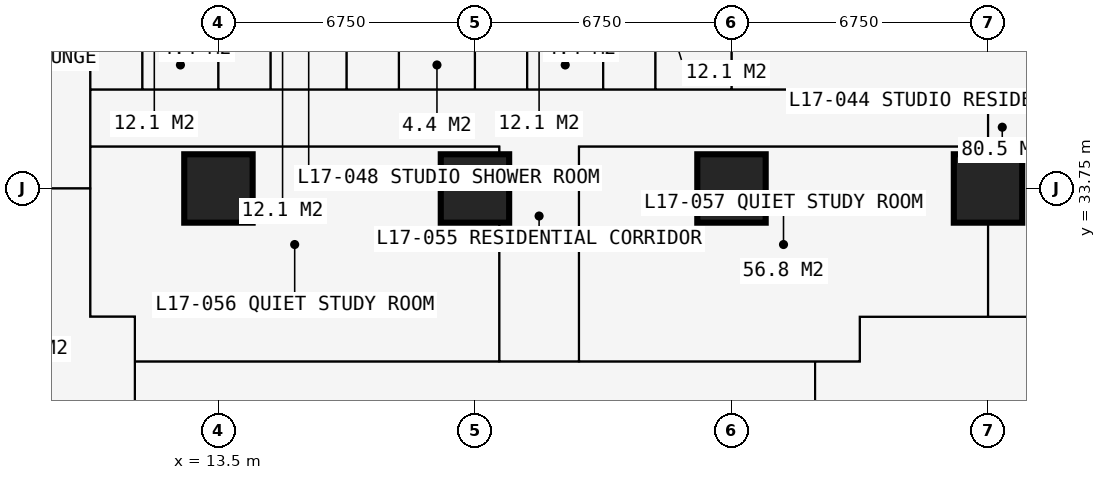
"""IFC4 building model, lengths in metres.
Left out: names, types, materials, properties, quantities, classifications, styles, units other than length and angle.
Written with IfcOpenShell. Run it as: python <this file> out.ifc"""

import sys

from ifc_helpers import new_model, si_unit, direction, frame, frame_2d, origin, origin_2d, place, context, subcontext, project, spatial, rectangle, extrude, element, fill, save


model = new_model("IFC4")
c1 = context("Model", 3, precision=1e-05, world=origin(), true_north=direction((0.0, 1.0)))
c2 = subcontext(c1, "Body", "Model", "MODEL_VIEW")
j1 = project(units=[si_unit("LENGTHUNIT", "METRE"), si_unit("PLANEANGLEUNIT", "RADIAN")], contexts=[c1])
p1 = place(None, origin())
s1 = spatial("IfcSite", under=j1, at=p1, CompositionType="ELEMENT")
p2 = place(p1, origin())
s2 = spatial("IfcBuilding", under=s1, at=p2, CompositionType="ELEMENT")
p3 = place(p2, frame((0.0, 0.0, 64.8)))
s3 = spatial("IfcBuildingStorey", under=s2, at=p3, CompositionType="ELEMENT", Elevation=64.8)
for number, where, z_axis, x_axis in (
    (1, (13.5, 33.75, 0.0), (0.0, 0.0, 1.0), (1.0, 0.0, 0.0)),
    (2, (20.25, 33.75, 0.0), (0.0, 0.0, 1.0), (1.0, 0.0, 0.0)),
    (3, (27.0, 33.75, 0.0), (0.0, 0.0, 1.0), (1.0, 0.0, 0.0)),
    (4, (33.75, 33.75, 0.0), (0.0, 0.0, 1.0), (1.0, 0.0, 0.0)),
):
    element("IfcColumn", number, at=place(p3, frame(where, z_axis=z_axis, x_axis=x_axis)), inside=s3, PredefinedType="COLUMN", context=c2, shape_type="SweptSolid", body=[
        extrude(rectangle(XDim=1.8, YDim=1.8, at=origin_2d()), origin(), (0.0, 0.0, 1.0), 3.6),
    ])
p4 = place(p3, frame((4.15, 33.75, 0.0), z_axis=(0.0, 0.0, 1.0), x_axis=(1.0, 0.0, 0.0)))
e5 = element("IfcWall", 5, at=p4, inside=s3, PredefinedType="PARTITIONING", context=c2, shape_type="SweptSolid", body=[
    extrude(rectangle(XDim=5.975, YDim=0.15, at=frame_2d((2.988, 0.0))), origin(), (0.0, 0.0, 1.0), 2.877),
])
p5 = place(p3, frame((10.125, 30.375, 0.0), z_axis=(0.0, 0.0, 1.0), x_axis=(0.0, 1.0, 0.0)))
e6 = element("IfcWall", 6, at=p5, inside=s3, PredefinedType="PARTITIONING", context=c2, shape_type="SweptSolid", body=[
    extrude(rectangle(XDim=10.859, YDim=0.15, at=frame_2d((5.429, 0.0))), origin(), (0.0, 0.0, 1.0), 3.375),
])
p6 = place(p5, frame((4.725, 0.0, 0.0)))
e7 = element("IfcOpeningElement", 7, at=p6, cuts=e6, PredefinedType="OPENING", context=c2, shape_type="SweptSolid", body=[
    extrude(rectangle(XDim=1.0, YDim=2.2, at=frame_2d((0.5, 1.1))), frame((0.0, 0.085, 0.0), z_axis=(0.0, -1.0, 0.0), x_axis=(1.0, 0.0, 0.0)), (0.0, 0.0, 1.0), 0.17),
])
p7 = place(p3, frame((10.125, 30.375, 0.0), z_axis=(0.0, 0.0, 1.0), x_axis=(1.0, 0.0, 0.0)))
e8 = element("IfcWall", 8, at=p7, inside=s3, PredefinedType="PARTITIONING", context=c2, shape_type="SweptSolid", body=[
    extrude(rectangle(XDim=1.175, YDim=0.15, at=frame_2d((0.587, 0.0))), origin(), (0.0, 0.0, 1.0), 3.375),
])
p8 = place(p3, frame((10.125, 34.85, 0.0), z_axis=(0.0, 0.0, 1.0), x_axis=(1.0, 0.0, 0.0)))
e9 = element("IfcWall", 9, at=p8, inside=s3, PredefinedType="PARTITIONING", context=c2, shape_type="SweptSolid", body=[
    extrude(rectangle(XDim=10.762, YDim=0.15, at=frame_2d((5.381, 0.0))), origin(), (0.0, 0.0, 1.0), 3.375),
])
p9 = place(p8, frame((4.9, 0.0, 0.0)))
e10 = element("IfcOpeningElement", 10, at=p9, cuts=e9, PredefinedType="OPENING", context=c2, shape_type="SweptSolid", body=[
    extrude(rectangle(XDim=0.95, YDim=2.2, at=frame_2d((0.475, 1.1))), frame((0.0, 0.085, 0.0), z_axis=(0.0, -1.0, 0.0), x_axis=(1.0, 0.0, 0.0)), (0.0, 0.0, 1.0), 0.17),
])
p10 = place(p3, frame((10.125, 36.35, 0.0), z_axis=(0.0, 0.0, 1.0), x_axis=(1.0, 0.0, 0.0)))
e11 = element("IfcWall", 11, at=p10, inside=s3, PredefinedType="PARTITIONING", context=c2, shape_type="SweptSolid", body=[
    extrude(rectangle(XDim=23.625, YDim=0.1, at=frame_2d((11.812, 0.0))), origin(), (0.0, 0.0, 1.0), 3.375),
])
p11 = place(p10, frame((0.2, 0.0, 0.0)))
e12 = element("IfcOpeningElement", 12, at=p11, cuts=e11, PredefinedType="OPENING", context=c2, shape_type="SweptSolid", body=[
    extrude(rectangle(XDim=0.95, YDim=2.2, at=frame_2d((0.475, 1.1))), frame((0.0, 0.06, 0.0), z_axis=(0.0, -1.0, 0.0), x_axis=(1.0, 0.0, 0.0)), (0.0, 0.0, 1.0), 0.12),
])
p12 = place(p10, frame((3.625, 0.0, 0.0)))
e13 = element("IfcOpeningElement", 13, at=p12, cuts=e11, PredefinedType="OPENING", context=c2, shape_type="SweptSolid", body=[
    extrude(rectangle(XDim=0.95, YDim=2.2, at=frame_2d((0.475, 1.1))), frame((0.0, 0.06, 0.0), z_axis=(0.0, -1.0, 0.0), x_axis=(1.0, 0.0, 0.0)), (0.0, 0.0, 1.0), 0.12),
])
p13 = place(p10, frame((7.0, 0.0, 0.0)))
e14 = element("IfcOpeningElement", 14, at=p13, cuts=e11, PredefinedType="OPENING", context=c2, shape_type="SweptSolid", body=[
    extrude(rectangle(XDim=0.95, YDim=2.2, at=frame_2d((0.475, 1.1))), frame((0.0, 0.06, 0.0), z_axis=(0.0, -1.0, 0.0), x_axis=(1.0, 0.0, 0.0)), (0.0, 0.0, 1.0), 0.12),
])
p14 = place(p10, frame((10.375, 0.0, 0.0)))
e15 = element("IfcOpeningElement", 15, at=p14, cuts=e11, PredefinedType="OPENING", context=c2, shape_type="SweptSolid", body=[
    extrude(rectangle(XDim=0.95, YDim=2.2, at=frame_2d((0.475, 1.1))), frame((0.0, 0.06, 0.0), z_axis=(0.0, -1.0, 0.0), x_axis=(1.0, 0.0, 0.0)), (0.0, 0.0, 1.0), 0.12),
])
p15 = place(p10, frame((13.75, 0.0, 0.0)))
e16 = element("IfcOpeningElement", 16, at=p15, cuts=e11, PredefinedType="OPENING", context=c2, shape_type="SweptSolid", body=[
    extrude(rectangle(XDim=0.95, YDim=2.2, at=frame_2d((0.475, 1.1))), frame((0.0, 0.06, 0.0), z_axis=(0.0, -1.0, 0.0), x_axis=(1.0, 0.0, 0.0)), (0.0, 0.0, 1.0), 0.12),
])
p16 = place(p3, frame((11.3, 11.3, 0.0), z_axis=(0.0, 0.0, 1.0), x_axis=(0.0, 1.0, 0.0)))
e17 = element("IfcWall", 17, at=p16, inside=s3, PredefinedType="PARTITIONING", context=c2, shape_type="SweptSolid", body=[
    extrude(rectangle(XDim=19.075, YDim=0.15, at=frame_2d((9.538, 0.0))), origin(), (0.0, 0.0, 1.0), 3.375),
])
p17 = place(p16, frame((10.137, 0.0, 0.0)))
e18 = element("IfcOpeningElement", 18, at=p17, cuts=e17, PredefinedType="OPENING", context=c2, shape_type="SweptSolid", body=[
    extrude(rectangle(XDim=1.0, YDim=2.2, at=frame_2d((0.5, 1.1))), frame((0.0, 0.085, 0.0), z_axis=(0.0, -1.0, 0.0), x_axis=(1.0, 0.0, 0.0)), (0.0, 0.0, 1.0), 0.17),
])
p18 = place(p3, frame((11.3, 29.2, 0.0), z_axis=(0.0, 0.0, 1.0), x_axis=(1.0, 0.0, 0.0)))
e19 = element("IfcWall", 19, at=p18, inside=s3, PredefinedType="PARTITIONING", context=c2, shape_type="SweptSolid", body=[
    extrude(rectangle(XDim=19.075, YDim=0.15, at=frame_2d((9.538, 0.0))), origin(), (0.0, 0.0, 1.0), 3.375),
])
p19 = place(p18, frame((10.137, 0.0, 0.0)))
e20 = element("IfcOpeningElement", 20, at=p19, cuts=e19, PredefinedType="OPENING", context=c2, shape_type="SweptSolid", body=[
    extrude(rectangle(XDim=1.0, YDim=2.2, at=frame_2d((0.5, 1.1))), frame((0.0, 0.085, 0.0), z_axis=(0.0, -1.0, 0.0), x_axis=(1.0, 0.0, 0.0)), (0.0, 0.0, 1.0), 0.17),
])
p20 = place(p3, frame((11.5, 36.35, 0.0), z_axis=(0.0, 0.0, 1.0), x_axis=(0.0, 1.0, 0.0)))
e21 = element("IfcWall", 21, at=p20, inside=s3, PredefinedType="PARTITIONING", context=c2, shape_type="SweptSolid", body=[
    extrude(rectangle(XDim=2.2, YDim=0.1, at=frame_2d((1.1, 0.0))), origin(), (0.0, 0.0, 1.0), 3.375),
])
p21 = place(p20, frame((0.65, 0.0, 0.0)))
e22 = element("IfcOpeningElement", 22, at=p21, cuts=e21, PredefinedType="OPENING", context=c2, shape_type="SweptSolid", body=[
    extrude(rectangle(XDim=0.9, YDim=2.2, at=frame_2d((0.45, 1.1))), frame((0.0, 0.06, 0.0), z_axis=(0.0, -1.0, 0.0), x_axis=(1.0, 0.0, 0.0)), (0.0, 0.0, 1.0), 0.12),
])
p22 = place(p3, frame((13.5, 36.35, 0.0), z_axis=(0.0, 0.0, 1.0), x_axis=(0.0, 1.0, 0.0)))
e23 = element("IfcWall", 23, at=p22, inside=s3, PredefinedType="PARTITIONING", context=c2, shape_type="SweptSolid", body=[
    extrude(rectangle(XDim=4.884, YDim=0.175, at=frame_2d((2.442, 0.0))), origin(), (0.0, 0.0, 1.0), 2.61),
])
p23 = place(p3, frame((14.875, 36.35, 0.0), z_axis=(0.0, 0.0, 1.0), x_axis=(0.0, 1.0, 0.0)))
e24 = element("IfcWall", 24, at=p23, inside=s3, PredefinedType="PARTITIONING", context=c2, shape_type="SweptSolid", body=[
    extrude(rectangle(XDim=2.2, YDim=0.1, at=frame_2d((1.1, 0.0))), origin(), (0.0, 0.0, 1.0), 3.375),
])
p24 = place(p23, frame((0.65, 0.0, 0.0)))
e25 = element("IfcOpeningElement", 25, at=p24, cuts=e24, PredefinedType="OPENING", context=c2, shape_type="SweptSolid", body=[
    extrude(rectangle(XDim=0.9, YDim=2.2, at=frame_2d((0.45, 1.1))), frame((0.0, 0.06, 0.0), z_axis=(0.0, -1.0, 0.0), x_axis=(1.0, 0.0, 0.0)), (0.0, 0.0, 1.0), 0.12),
])
p25 = place(p3, frame((16.875, 36.35, 0.0), z_axis=(0.0, 0.0, 1.0), x_axis=(0.0, 1.0, 0.0)))
e26 = element("IfcWall", 26, at=p25, inside=s3, PredefinedType="PARTITIONING", context=c2, shape_type="SweptSolid", body=[
    extrude(rectangle(XDim=4.884, YDim=0.175, at=frame_2d((2.442, 0.0))), origin(), (0.0, 0.0, 1.0), 3.375),
])
p26 = place(p3, frame((18.25, 36.35, 0.0), z_axis=(0.0, 0.0, 1.0), x_axis=(0.0, 1.0, 0.0)))
e27 = element("IfcWall", 27, at=p26, inside=s3, PredefinedType="PARTITIONING", context=c2, shape_type="SweptSolid", body=[
    extrude(rectangle(XDim=2.2, YDim=0.1, at=frame_2d((1.1, 0.0))), origin(), (0.0, 0.0, 1.0), 3.375),
])
p27 = place(p26, frame((0.65, 0.0, 0.0)))
e28 = element("IfcOpeningElement", 28, at=p27, cuts=e27, PredefinedType="OPENING", context=c2, shape_type="SweptSolid", body=[
    extrude(rectangle(XDim=0.9, YDim=2.2, at=frame_2d((0.45, 1.1))), frame((0.0, 0.06, 0.0), z_axis=(0.0, -1.0, 0.0), x_axis=(1.0, 0.0, 0.0)), (0.0, 0.0, 1.0), 0.12),
])
p28 = place(p3, frame((20.25, 36.35, 0.0), z_axis=(0.0, 0.0, 1.0), x_axis=(0.0, 1.0, 0.0)))
e29 = element("IfcWall", 29, at=p28, inside=s3, PredefinedType="PARTITIONING", context=c2, shape_type="SweptSolid", body=[
    extrude(rectangle(XDim=4.884, YDim=0.175, at=frame_2d((2.442, 0.0))), origin(), (0.0, 0.0, 1.0), 2.61),
])
p29 = place(p3, frame((20.887, 29.2, 0.0), z_axis=(0.0, 0.0, 1.0), x_axis=(0.0, 1.0, 0.0)))
e30 = element("IfcWall", 30, at=p29, inside=s3, PredefinedType="PARTITIONING", context=c2, shape_type="SweptSolid", body=[
    extrude(rectangle(XDim=5.65, YDim=0.15, at=frame_2d((2.825, 0.0))), origin(), (0.0, 0.0, 1.0), 3.375),
])
p30 = place(p3, frame((21.625, 36.35, 0.0), z_axis=(0.0, 0.0, 1.0), x_axis=(0.0, 1.0, 0.0)))
e31 = element("IfcWall", 31, at=p30, inside=s3, PredefinedType="PARTITIONING", context=c2, shape_type="SweptSolid", body=[
    extrude(rectangle(XDim=2.2, YDim=0.1, at=frame_2d((1.1, 0.0))), origin(), (0.0, 0.0, 1.0), 3.375),
])
p31 = place(p30, frame((0.65, 0.0, 0.0)))
e32 = element("IfcOpeningElement", 32, at=p31, cuts=e31, PredefinedType="OPENING", context=c2, shape_type="SweptSolid", body=[
    extrude(rectangle(XDim=0.9, YDim=2.2, at=frame_2d((0.45, 1.1))), frame((0.0, 0.06, 0.0), z_axis=(0.0, -1.0, 0.0), x_axis=(1.0, 0.0, 0.0)), (0.0, 0.0, 1.0), 0.12),
])
p32 = place(p3, frame((22.988, 34.85, 0.0), z_axis=(0.0, 0.0, 1.0), x_axis=(1.0, 0.0, 0.0)))
e33 = element("IfcWall", 33, at=p32, inside=s3, PredefinedType="PARTITIONING", context=c2, shape_type="SweptSolid", body=[
    extrude(rectangle(XDim=10.762, YDim=0.15, at=frame_2d((5.381, 0.0))), origin(), (0.0, 0.0, 1.0), 3.375),
])
p33 = place(p32, frame((4.95, 0.0, 0.0)))
e34 = element("IfcOpeningElement", 34, at=p33, cuts=e33, PredefinedType="OPENING", context=c2, shape_type="SweptSolid", body=[
    extrude(rectangle(XDim=0.95, YDim=2.2, at=frame_2d((0.475, 1.1))), frame((0.0, 0.085, 0.0), z_axis=(0.0, -1.0, 0.0), x_axis=(1.0, 0.0, 0.0)), (0.0, 0.0, 1.0), 0.17),
])
p34 = place(p3, frame((22.988, 29.2, 0.0), z_axis=(0.0, 0.0, 1.0), x_axis=(0.0, 1.0, 0.0)))
e35 = element("IfcWall", 35, at=p34, inside=s3, PredefinedType="PARTITIONING", context=c2, shape_type="SweptSolid", body=[
    extrude(rectangle(XDim=5.65, YDim=0.15, at=frame_2d((2.825, 0.0))), origin(), (0.0, 0.0, 1.0), 3.375),
])
p35 = place(p3, frame((23.625, 36.35, 0.0), z_axis=(0.0, 0.0, 1.0), x_axis=(0.0, 1.0, 0.0)))
e36 = element("IfcWall", 36, at=p35, inside=s3, PredefinedType="PARTITIONING", context=c2, shape_type="SweptSolid", body=[
    extrude(rectangle(XDim=4.884, YDim=0.175, at=frame_2d((2.442, 0.0))), origin(), (0.0, 0.0, 1.0), 3.375),
])
p36 = place(p3, frame((25.0, 36.35, 0.0), z_axis=(0.0, 0.0, 1.0), x_axis=(0.0, 1.0, 0.0)))
e37 = element("IfcWall", 37, at=p36, inside=s3, PredefinedType="PARTITIONING", context=c2, shape_type="SweptSolid", body=[
    extrude(rectangle(XDim=2.2, YDim=0.1, at=frame_2d((1.1, 0.0))), origin(), (0.0, 0.0, 1.0), 3.375),
])
p37 = place(p36, frame((0.65, 0.0, 0.0)))
e38 = element("IfcOpeningElement", 38, at=p37, cuts=e37, PredefinedType="OPENING", context=c2, shape_type="SweptSolid", body=[
    extrude(rectangle(XDim=0.9, YDim=2.2, at=frame_2d((0.45, 1.1))), frame((0.0, 0.06, 0.0), z_axis=(0.0, -1.0, 0.0), x_axis=(1.0, 0.0, 0.0)), (0.0, 0.0, 1.0), 0.12),
])
p38 = place(p3, frame((27.0, 36.35, 0.0), z_axis=(0.0, 0.0, 1.0), x_axis=(0.0, 1.0, 0.0)))
e39 = element("IfcWall", 39, at=p38, inside=s3, PredefinedType="PARTITIONING", context=c2, shape_type="SweptSolid", body=[
    extrude(rectangle(XDim=4.884, YDim=0.15, at=frame_2d((2.442, 0.0))), origin(), (0.0, 0.0, 1.0), 2.806),
])
p39 = place(p3, frame((29.2, 11.3, 0.0), z_axis=(0.0, 0.0, 1.0), x_axis=(0.0, 1.0, 0.0)))
e40 = element("IfcWall", 40, at=p39, inside=s3, PredefinedType="PARTITIONING", context=c2, shape_type="SweptSolid", body=[
    extrude(rectangle(XDim=17.9, YDim=0.2, at=frame_2d((8.95, 0.0))), origin(), (0.0, 0.0, 1.0), 3.375),
])
p40 = place(p39, frame((8.35, 0.0, 0.0)))
e41 = element("IfcOpeningElement", 41, at=p40, cuts=e40, PredefinedType="OPENING", context=c2, shape_type="SweptSolid", body=[
    extrude(rectangle(XDim=1.2, YDim=2.2, at=frame_2d((0.6, 1.1))), frame((0.0, 0.11, 0.0), z_axis=(0.0, -1.0, 0.0), x_axis=(1.0, 0.0, 0.0)), (0.0, 0.0, 1.0), 0.22),
])
p41 = place(p3, frame((30.375, 29.2, 0.0), z_axis=(0.0, 0.0, 1.0), x_axis=(0.0, 1.0, 0.0)))
e42 = element("IfcWall", 42, at=p41, inside=s3, PredefinedType="PARTITIONING", context=c2, shape_type="SweptSolid", body=[
    extrude(rectangle(XDim=1.175, YDim=0.15, at=frame_2d((0.587, 0.0))), origin(), (0.0, 0.0, 1.0), 3.375),
])
p42 = place(p3, frame((30.375, 30.375, 0.0), z_axis=(0.0, 0.0, 1.0), x_axis=(1.0, 0.0, 0.0)))
e43 = element("IfcWall", 43, at=p42, inside=s3, PredefinedType="PARTITIONING", context=c2, shape_type="SweptSolid", body=[
    extrude(rectangle(XDim=10.859, YDim=0.15, at=frame_2d((5.429, 0.0))), origin(), (0.0, 0.0, 1.0), 3.375),
])
p43 = place(p42, frame((4.725, 0.0, 0.0)))
e44 = element("IfcOpeningElement", 44, at=p43, cuts=e43, PredefinedType="OPENING", context=c2, shape_type="SweptSolid", body=[
    extrude(rectangle(XDim=1.0, YDim=2.2, at=frame_2d((0.5, 1.1))), frame((0.0, 0.085, 0.0), z_axis=(0.0, -1.0, 0.0), x_axis=(1.0, 0.0, 0.0)), (0.0, 0.0, 1.0), 0.17),
])
p44 = place(p3, frame((33.75, 30.375, 0.0), z_axis=(0.0, 0.0, 1.0), x_axis=(0.0, 1.0, 0.0)))
e45 = element("IfcWall", 45, at=p44, inside=s3, PredefinedType="PARTITIONING", context=c2, shape_type="SweptSolid", body=[
    extrude(rectangle(XDim=5.975, YDim=0.15, at=frame_2d((2.988, 0.0))), origin(), (0.0, 0.0, 1.0), 2.877),
])
p45 = place(p11, origin())
e46 = element("IfcDoor", 46, at=p45, inside=s3, OperationType="SINGLE_SWING_LEFT", PredefinedType="DOOR", context=c2, shape_type="SweptSolid", body=[
    extrude(rectangle(XDim=0.95, YDim=2.2, at=frame_2d((0.475, 1.1))), frame((0.0, 0.025, 0.0), z_axis=(0.0, -1.0, 0.0), x_axis=(1.0, 0.0, 0.0)), (0.0, 0.0, 1.0), 0.05),
])
fill(e12, e46)
p46 = place(p21, origin())
e47 = element("IfcDoor", 47, at=p46, inside=s3, OperationType="SINGLE_SWING_RIGHT", PredefinedType="DOOR", context=c2, shape_type="SweptSolid", body=[
    extrude(rectangle(XDim=0.9, YDim=2.2, at=frame_2d((0.45, 1.1))), frame((0.0, 0.025, 0.0), z_axis=(0.0, -1.0, 0.0), x_axis=(1.0, 0.0, 0.0)), (0.0, 0.0, 1.0), 0.05),
])
fill(e22, e47)
p47 = place(p12, origin())
e48 = element("IfcDoor", 48, at=p47, inside=s3, OperationType="SINGLE_SWING_LEFT", PredefinedType="DOOR", context=c2, shape_type="SweptSolid", body=[
    extrude(rectangle(XDim=0.95, YDim=2.2, at=frame_2d((0.475, 1.1))), frame((0.0, 0.025, 0.0), z_axis=(0.0, -1.0, 0.0), x_axis=(1.0, 0.0, 0.0)), (0.0, 0.0, 1.0), 0.05),
])
fill(e13, e48)
p48 = place(p24, origin())
e49 = element("IfcDoor", 49, at=p48, inside=s3, OperationType="SINGLE_SWING_RIGHT", PredefinedType="DOOR", context=c2, shape_type="SweptSolid", body=[
    extrude(rectangle(XDim=0.9, YDim=2.2, at=frame_2d((0.45, 1.1))), frame((0.0, 0.025, 0.0), z_axis=(0.0, -1.0, 0.0), x_axis=(1.0, 0.0, 0.0)), (0.0, 0.0, 1.0), 0.05),
])
fill(e25, e49)
p49 = place(p13, origin())
e50 = element("IfcDoor", 50, at=p49, inside=s3, OperationType="SINGLE_SWING_LEFT", PredefinedType="DOOR", context=c2, shape_type="SweptSolid", body=[
    extrude(rectangle(XDim=0.95, YDim=2.2, at=frame_2d((0.475, 1.1))), frame((0.0, 0.025, 0.0), z_axis=(0.0, -1.0, 0.0), x_axis=(1.0, 0.0, 0.0)), (0.0, 0.0, 1.0), 0.05),
])
fill(e14, e50)
p50 = place(p27, origin())
e51 = element("IfcDoor", 51, at=p50, inside=s3, OperationType="SINGLE_SWING_RIGHT", PredefinedType="DOOR", context=c2, shape_type="SweptSolid", body=[
    extrude(rectangle(XDim=0.9, YDim=2.2, at=frame_2d((0.45, 1.1))), frame((0.0, 0.025, 0.0), z_axis=(0.0, -1.0, 0.0), x_axis=(1.0, 0.0, 0.0)), (0.0, 0.0, 1.0), 0.05),
])
fill(e28, e51)
p51 = place(p14, origin())
e52 = element("IfcDoor", 52, at=p51, inside=s3, OperationType="SINGLE_SWING_LEFT", PredefinedType="DOOR", context=c2, shape_type="SweptSolid", body=[
    extrude(rectangle(XDim=0.95, YDim=2.2, at=frame_2d((0.475, 1.1))), frame((0.0, 0.025, 0.0), z_axis=(0.0, -1.0, 0.0), x_axis=(1.0, 0.0, 0.0)), (0.0, 0.0, 1.0), 0.05),
])
fill(e15, e52)
p52 = place(p31, origin())
e53 = element("IfcDoor", 53, at=p52, inside=s3, OperationType="SINGLE_SWING_RIGHT", PredefinedType="DOOR", context=c2, shape_type="SweptSolid", body=[
    extrude(rectangle(XDim=0.9, YDim=2.2, at=frame_2d((0.45, 1.1))), frame((0.0, 0.025, 0.0), z_axis=(0.0, -1.0, 0.0), x_axis=(1.0, 0.0, 0.0)), (0.0, 0.0, 1.0), 0.05),
])
fill(e32, e53)
p53 = place(p15, origin())
e54 = element("IfcDoor", 54, at=p53, inside=s3, OperationType="SINGLE_SWING_LEFT", PredefinedType="DOOR", context=c2, shape_type="SweptSolid", body=[
    extrude(rectangle(XDim=0.95, YDim=2.2, at=frame_2d((0.475, 1.1))), frame((0.0, 0.025, 0.0), z_axis=(0.0, -1.0, 0.0), x_axis=(1.0, 0.0, 0.0)), (0.0, 0.0, 1.0), 0.05),
])
fill(e16, e54)
p54 = place(p37, origin())
e55 = element("IfcDoor", 55, at=p54, inside=s3, OperationType="SINGLE_SWING_RIGHT", PredefinedType="DOOR", context=c2, shape_type="SweptSolid", body=[
    extrude(rectangle(XDim=0.9, YDim=2.2, at=frame_2d((0.45, 1.1))), frame((0.0, 0.025, 0.0), z_axis=(0.0, -1.0, 0.0), x_axis=(1.0, 0.0, 0.0)), (0.0, 0.0, 1.0), 0.05),
])
fill(e38, e55)
p55 = place(p19, origin())
e56 = element("IfcDoor", 56, at=p55, inside=s3, OperationType="SINGLE_SWING_LEFT", PredefinedType="DOOR", context=c2, shape_type="SweptSolid", body=[
    extrude(rectangle(XDim=1.0, YDim=2.2, at=frame_2d((0.5, 1.1))), frame((0.0, 0.025, 0.0), z_axis=(0.0, -1.0, 0.0), x_axis=(1.0, 0.0, 0.0)), (0.0, 0.0, 1.0), 0.05),
])
fill(e20, e56)
p56 = place(p9, origin())
e57 = element("IfcDoor", 57, at=p56, inside=s3, OperationType="SINGLE_SWING_LEFT", PredefinedType="DOOR", context=c2, shape_type="SweptSolid", body=[
    extrude(rectangle(XDim=0.95, YDim=2.2, at=frame_2d((0.475, 1.1))), frame((0.0, 0.025, 0.0), z_axis=(0.0, -1.0, 0.0), x_axis=(1.0, 0.0, 0.0)), (0.0, 0.0, 1.0), 0.05),
])
fill(e10, e57)
p57 = place(p33, origin())
e58 = element("IfcDoor", 58, at=p57, inside=s3, OperationType="SINGLE_SWING_LEFT", PredefinedType="DOOR", context=c2, shape_type="SweptSolid", body=[
    extrude(rectangle(XDim=0.95, YDim=2.2, at=frame_2d((0.475, 1.1))), frame((0.0, 0.025, 0.0), z_axis=(0.0, -1.0, 0.0), x_axis=(1.0, 0.0, 0.0)), (0.0, 0.0, 1.0), 0.05),
])
fill(e34, e58)
p58 = place(p6, origin())
e59 = element("IfcDoor", 59, at=p58, inside=s3, OperationType="SINGLE_SWING_LEFT", PredefinedType="DOOR", context=c2, shape_type="SweptSolid", body=[
    extrude(rectangle(XDim=1.0, YDim=2.2, at=frame_2d((0.5, 1.1))), frame((0.0, 0.025, 0.0), z_axis=(0.0, -1.0, 0.0), x_axis=(1.0, 0.0, 0.0)), (0.0, 0.0, 1.0), 0.05),
])
fill(e7, e59)
save(model, sys.argv[1])
